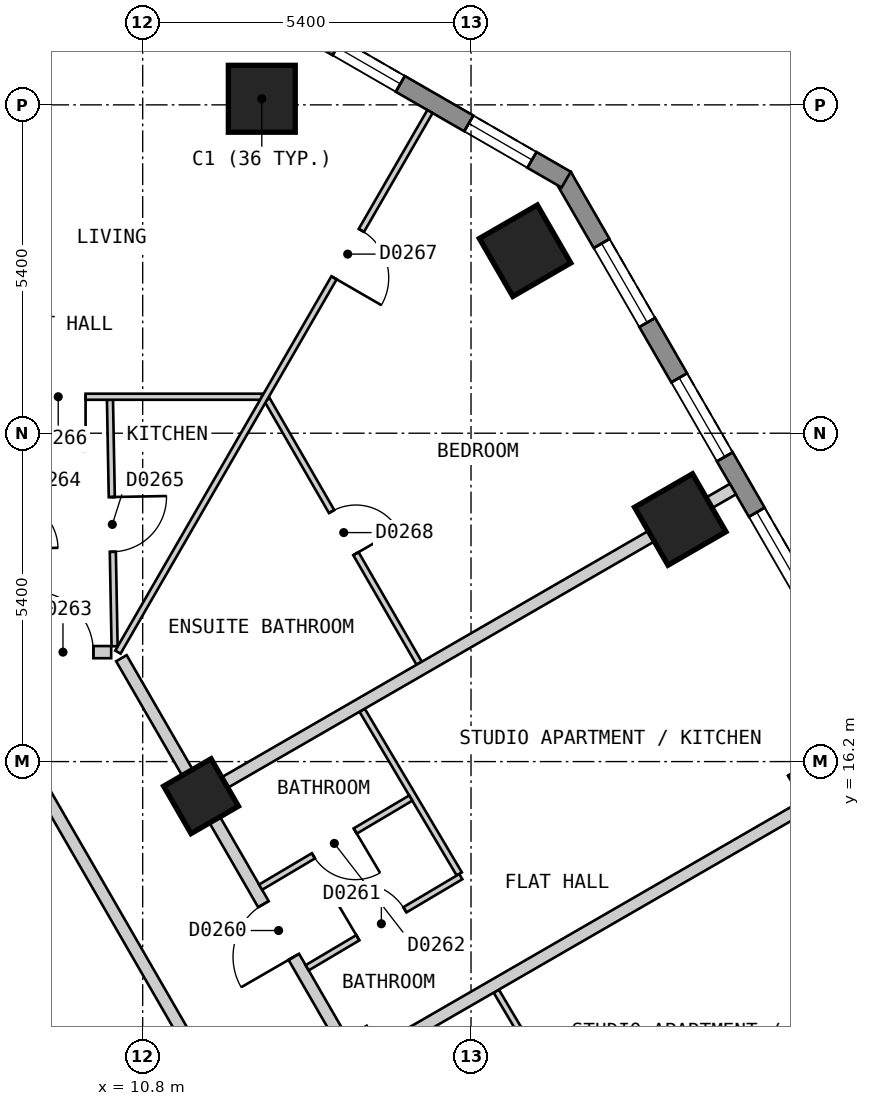
"""IFC4 building model, lengths in metres.
Left out: names, types, materials, properties, quantities, classifications, styles, units other than length and angle.
Written with IfcOpenShell. Run it as: python <this file> out.ifc"""

import sys

from ifc_helpers import new_model, si_unit, direction, frame, frame_2d, origin, origin_2d, place, context, subcontext, project, spatial, polyline, rectangle, outline, extrude, element, fill, save


model = new_model("IFC4")
c1 = context("Model", 3, precision=1e-05, world=origin(), true_north=direction((0.0, 1.0)))
c2 = subcontext(c1, "Body", "Model", "MODEL_VIEW")
j1 = project(units=[si_unit("LENGTHUNIT", "METRE"), si_unit("PLANEANGLEUNIT", "RADIAN")], contexts=[c1])
p1 = place(None, origin())
s1 = spatial("IfcSite", under=j1, at=p1, CompositionType="ELEMENT")
p2 = place(p1, origin())
s2 = spatial("IfcBuilding", under=s1, at=p2, CompositionType="ELEMENT")
p3 = place(p2, frame((0.0, 0.0, 41.4)))
s3 = spatial("IfcBuildingStorey", under=s2, at=p3, CompositionType="ELEMENT", Elevation=41.4)
for number, where, z_axis, x_axis in (
    (1, (12.759, 27.1, 0.0), (0.0, 0.0, 1.0), (-1.0, 0.0, 0.0)),
    (2, (22.193, 15.761, 0.0), (0.0, 0.0, 1.0), (-0.5, 0.866, 0.0)),
    (3, (19.641, 20.181, 0.0), (0.0, 0.0, 1.0), (-0.5, 0.866, 0.0)),
    (4, (17.089, 24.601, 0.0), (0.0, 0.0, 1.0), (-0.5, 0.866, 0.0)),
):
    element("IfcColumn", number, at=place(p3, frame(where, z_axis=z_axis, x_axis=x_axis)), inside=s3, PredefinedType="COLUMN", context=c2, shape_type="SweptSolid", body=[
        extrude(rectangle(XDim=1.1, YDim=1.1, at=origin_2d()), origin(), (0.0, 0.0, 1.0), 3.0),
    ])
p4 = place(p3, frame((11.76, 15.631, 0.0), z_axis=(0.0, 0.0, 1.0), x_axis=(-0.499984884929, 0.866034130299, 0.0)))
e5 = element("IfcColumn", 5, at=p4, inside=s3, PredefinedType="COLUMN", context=c2, shape_type="SweptSolid", body=[
    extrude(rectangle(XDim=0.9, YDim=0.9, at=origin_2d()), origin(), (0.0, 0.0, 1.0), 3.0),
])
p5 = place(p3, frame((31.22, 2.425, 0.0), z_axis=(0.0, 0.0, 1.0), x_axis=(-0.500001938803, 0.866024284413, 0.0)))
e6 = element("IfcWall", 6, at=p5, inside=s3, PredefinedType="SOLIDWALL", context=c2, shape_type="SweptSolid", body=[
    extrude(outline(polyline([(0.0, -0.15), (27.02, -0.15), (26.94, 0.15), (0.08, 0.15), (0.0, -0.15)])), origin(), (0.0, 0.0, 1.0), 2.7),
])
p6 = place(p5, frame((1.277, 0.0, 0.15)))
e7 = element("IfcOpeningElement", 7, at=p6, cuts=e6, PredefinedType="OPENING", context=c2, shape_type="SweptSolid", body=[
    extrude(rectangle(XDim=1.5, YDim=2.1, at=frame_2d((0.75, 1.05))), frame((0.0, 0.16, 0.0), z_axis=(0.0, -1.0, 0.0), x_axis=(1.0, 0.0, 0.0)), (0.0, 0.0, 1.0), 0.32),
])
p7 = place(p5, frame((3.829, 0.0, 0.15)))
e8 = element("IfcOpeningElement", 8, at=p7, cuts=e6, PredefinedType="OPENING", context=c2, shape_type="SweptSolid", body=[
    extrude(rectangle(XDim=1.5, YDim=2.1, at=frame_2d((0.75, 1.05))), frame((0.0, 0.16, 0.0), z_axis=(0.0, -1.0, 0.0), x_axis=(1.0, 0.0, 0.0)), (0.0, 0.0, 1.0), 0.32),
])
p8 = place(p5, frame((6.382, 0.0, 0.15)))
e9 = element("IfcOpeningElement", 9, at=p8, cuts=e6, PredefinedType="OPENING", context=c2, shape_type="SweptSolid", body=[
    extrude(rectangle(XDim=1.5, YDim=2.1, at=frame_2d((0.75, 1.05))), frame((0.0, 0.16, 0.0), z_axis=(0.0, -1.0, 0.0), x_axis=(1.0, 0.0, 0.0)), (0.0, 0.0, 1.0), 0.32),
])
p9 = place(p5, frame((8.933, 0.0, 0.15)))
e10 = element("IfcOpeningElement", 10, at=p9, cuts=e6, PredefinedType="OPENING", context=c2, shape_type="SweptSolid", body=[
    extrude(rectangle(XDim=1.5, YDim=2.1, at=frame_2d((0.75, 1.05))), frame((0.0, 0.16, 0.0), z_axis=(0.0, -1.0, 0.0), x_axis=(1.0, 0.0, 0.0)), (0.0, 0.0, 1.0), 0.32),
])
p10 = place(p5, frame((11.485, 0.0, 0.15)))
e11 = element("IfcOpeningElement", 11, at=p10, cuts=e6, PredefinedType="OPENING", context=c2, shape_type="SweptSolid", body=[
    extrude(rectangle(XDim=1.5, YDim=2.1, at=frame_2d((0.75, 1.05))), frame((0.0, 0.16, 0.0), z_axis=(0.0, -1.0, 0.0), x_axis=(1.0, 0.0, 0.0)), (0.0, 0.0, 1.0), 0.32),
])
p11 = place(p5, frame((14.037, 0.0, 0.15)))
e12 = element("IfcOpeningElement", 12, at=p11, cuts=e6, PredefinedType="OPENING", context=c2, shape_type="SweptSolid", body=[
    extrude(rectangle(XDim=1.5, YDim=2.1, at=frame_2d((0.75, 1.05))), frame((0.0, 0.16, 0.0), z_axis=(0.0, -1.0, 0.0), x_axis=(1.0, 0.0, 0.0)), (0.0, 0.0, 1.0), 0.32),
])
p12 = place(p5, frame((16.589, 0.0, 0.15)))
e13 = element("IfcOpeningElement", 13, at=p12, cuts=e6, PredefinedType="OPENING", context=c2, shape_type="SweptSolid", body=[
    extrude(rectangle(XDim=1.5, YDim=2.1, at=frame_2d((0.75, 1.05))), frame((0.0, 0.16, 0.0), z_axis=(0.0, -1.0, 0.0), x_axis=(1.0, 0.0, 0.0)), (0.0, 0.0, 1.0), 0.32),
])
p13 = place(p5, frame((19.141, 0.0, 0.15)))
e14 = element("IfcOpeningElement", 14, at=p13, cuts=e6, PredefinedType="OPENING", context=c2, shape_type="SweptSolid", body=[
    extrude(rectangle(XDim=1.5, YDim=2.1, at=frame_2d((0.75, 1.05))), frame((0.0, 0.16, 0.0), z_axis=(0.0, -1.0, 0.0), x_axis=(1.0, 0.0, 0.0)), (0.0, 0.0, 1.0), 0.32),
])
p14 = place(p5, frame((21.693, 0.0, 0.15)))
e15 = element("IfcOpeningElement", 15, at=p14, cuts=e6, PredefinedType="OPENING", context=c2, shape_type="SweptSolid", body=[
    extrude(rectangle(XDim=1.5, YDim=2.1, at=frame_2d((0.75, 1.05))), frame((0.0, 0.16, 0.0), z_axis=(0.0, -1.0, 0.0), x_axis=(1.0, 0.0, 0.0)), (0.0, 0.0, 1.0), 0.32),
])
p15 = place(p5, frame((24.244, 0.0, 0.15)))
e16 = element("IfcOpeningElement", 16, at=p15, cuts=e6, PredefinedType="OPENING", context=c2, shape_type="SweptSolid", body=[
    extrude(rectangle(XDim=1.5, YDim=2.1, at=frame_2d((0.75, 1.05))), frame((0.0, 0.16, 0.0), z_axis=(0.0, -1.0, 0.0), x_axis=(1.0, 0.0, 0.0)), (0.0, 0.0, 1.0), 0.32),
])
p16 = place(p3, frame((17.765, 25.77, 0.0), z_axis=(0.0, 0.0, 1.0), x_axis=(-0.866010750942, 0.50002537861, 0.0)))
e17 = element("IfcWall", 17, at=p16, inside=s3, PredefinedType="SOLIDWALL", context=c2, shape_type="SweptSolid", body=[
    extrude(outline(polyline([(0.0, -0.15), (5.0, -0.15), (4.919, 0.15), (0.08, 0.15), (0.0, -0.15)])), origin(), (0.0, 0.0, 1.0), 2.7),
])
p17 = place(p16, frame((0.65, 0.0, 0.15)))
e18 = element("IfcOpeningElement", 18, at=p17, cuts=e17, PredefinedType="OPENING", context=c2, shape_type="SweptSolid", body=[
    extrude(rectangle(XDim=1.2, YDim=2.1, at=frame_2d((0.6, 1.05))), frame((0.0, 0.16, 0.0), z_axis=(0.0, -1.0, 0.0), x_axis=(1.0, 0.0, 0.0)), (0.0, 0.0, 1.0), 0.32),
])
p18 = place(p16, frame((3.15, 0.0, 0.15)))
e19 = element("IfcOpeningElement", 19, at=p18, cuts=e17, PredefinedType="OPENING", context=c2, shape_type="SweptSolid", body=[
    extrude(rectangle(XDim=1.2, YDim=2.1, at=frame_2d((0.6, 1.05))), frame((0.0, 0.16, 0.0), z_axis=(0.0, -1.0, 0.0), x_axis=(1.0, 0.0, 0.0)), (0.0, 0.0, 1.0), 0.32),
])
p19 = place(p3, frame((6.409, 15.7, 0.0), z_axis=(0.0, 0.0, 1.0), x_axis=(0.499930377127, -0.866065596838, 0.0)))
e20 = element("IfcWall", 20, at=p19, inside=s3, PredefinedType="PARTITIONING", context=c2, shape_type="SweptSolid", body=[
    extrude(rectangle(XDim=8.775, YDim=0.2, at=frame_2d((4.388, 0.0))), origin(), (0.0, 0.0, 1.0), 2.7),
])
p20 = place(p3, frame((9.18, 15.7, 0.0), z_axis=(0.0, 0.0, 1.0), x_axis=(0.500003652032, -0.866023295272, 0.0)))
e21 = element("IfcWall", 21, at=p20, inside=s3, PredefinedType="PARTITIONING", context=c2, shape_type="SweptSolid", body=[
    extrude(rectangle(XDim=18.012, YDim=0.2, at=frame_2d((9.006, 0.0))), origin(), (0.0, 0.0, 1.0), 2.7),
])
p21 = place(p20, frame((8.556, 0.0, 0.0)))
e22 = element("IfcOpeningElement", 22, at=p21, cuts=e21, PredefinedType="OPENING", context=c2, shape_type="SweptSolid", body=[
    extrude(rectangle(XDim=0.9, YDim=2.1, at=frame_2d((0.45, 1.05))), frame((0.0, 0.11, 0.0), z_axis=(0.0, -1.0, 0.0), x_axis=(1.0, 0.0, 0.0)), (0.0, 0.0, 1.0), 0.22),
])
p22 = place(p3, frame((10.45, 17.9, 0.0), z_axis=(0.0, 0.0, 1.0), x_axis=(0.500034352617, -0.866005569383, 0.0)))
e23 = element("IfcWall", 23, at=p22, inside=s3, PredefinedType="PARTITIONING", context=c2, shape_type="SweptSolid", body=[
    extrude(rectangle(XDim=20.553, YDim=0.2, at=frame_2d((10.276, 0.0))), origin(), (0.0, 0.0, 1.0), 2.7),
])
p23 = place(p22, frame((14.879, 0.0, 0.0)))
e24 = element("IfcOpeningElement", 24, at=p23, cuts=e23, PredefinedType="OPENING", context=c2, shape_type="SweptSolid", body=[
    extrude(rectangle(XDim=1.0, YDim=2.1, at=frame_2d((0.5, 1.05))), frame((0.0, 0.11, 0.0), z_axis=(0.0, -1.0, 0.0), x_axis=(1.0, 0.0, 0.0)), (0.0, 0.0, 1.0), 0.22),
])
p24 = place(p22, frame((9.775, 0.0, 0.0)))
e25 = element("IfcOpeningElement", 25, at=p24, cuts=e23, PredefinedType="OPENING", context=c2, shape_type="SweptSolid", body=[
    extrude(rectangle(XDim=1.0, YDim=2.1, at=frame_2d((0.5, 1.05))), frame((0.0, 0.11, 0.0), z_axis=(0.0, -1.0, 0.0), x_axis=(1.0, 0.0, 0.0)), (0.0, 0.0, 1.0), 0.22),
])
p25 = place(p22, frame((4.671, 0.0, 0.0)))
e26 = element("IfcOpeningElement", 26, at=p25, cuts=e23, PredefinedType="OPENING", context=c2, shape_type="SweptSolid", body=[
    extrude(rectangle(XDim=1.0, YDim=2.1, at=frame_2d((0.5, 1.05))), frame((0.0, 0.11, 0.0), z_axis=(0.0, -1.0, 0.0), x_axis=(1.0, 0.0, 0.0)), (0.0, 0.0, 1.0), 0.22),
])
p26 = place(p3, frame((-10.276, 18.0, 0.0), z_axis=(0.0, 0.0, 1.0), x_axis=(1.0, 0.0, 0.0)))
e27 = element("IfcWall", 27, at=p26, inside=s3, PredefinedType="PARTITIONING", context=c2, shape_type="SweptSolid", body=[
    extrude(rectangle(XDim=20.558, YDim=0.2, at=frame_2d((10.279, 0.0))), origin(), (0.0, 0.0, 1.0), 2.7),
])
p27 = place(p26, frame((19.265, 0.0, 0.0)))
e28 = element("IfcOpeningElement", 28, at=p27, cuts=e27, PredefinedType="OPENING", context=c2, shape_type="SweptSolid", body=[
    extrude(rectangle(XDim=1.0, YDim=2.1, at=frame_2d((0.5, 1.05))), frame((0.0, 0.11, 0.0), z_axis=(0.0, -1.0, 0.0), x_axis=(1.0, 0.0, 0.0)), (0.0, 0.0, 1.0), 0.22),
])
p28 = place(p26, frame((14.879, 0.0, 0.0)))
e29 = element("IfcOpeningElement", 29, at=p28, cuts=e27, PredefinedType="OPENING", context=c2, shape_type="SweptSolid", body=[
    extrude(rectangle(XDim=1.0, YDim=2.1, at=frame_2d((0.5, 1.05))), frame((0.0, 0.11, 0.0), z_axis=(0.0, -1.0, 0.0), x_axis=(1.0, 0.0, 0.0)), (0.0, 0.0, 1.0), 0.22),
])
p29 = place(p26, frame((4.671, 0.0, 0.0)))
e30 = element("IfcOpeningElement", 30, at=p29, cuts=e27, PredefinedType="OPENING", context=c2, shape_type="SweptSolid", body=[
    extrude(rectangle(XDim=1.0, YDim=2.1, at=frame_2d((0.5, 1.05))), frame((0.0, 0.11, 0.0), z_axis=(0.0, -1.0, 0.0), x_axis=(1.0, 0.0, 0.0)), (0.0, 0.0, 1.0), 0.22),
])
p30 = place(p3, frame((16.615, 12.425, 0.0), z_axis=(0.0, 0.0, 1.0), x_axis=(0.510241930604, -0.860030913546, 0.0)))
e31 = element("IfcWall", 31, at=p30, inside=s3, PredefinedType="PARTITIONING", context=c2, shape_type="SweptSolid", body=[
    extrude(rectangle(XDim=3.136, YDim=0.1, at=frame_2d((1.568, 0.0))), origin(), (0.0, 0.0, 1.0), 2.7),
])
p31 = place(p3, frame((14.409, 17.045, 0.0), z_axis=(0.0, 0.0, 1.0), x_axis=(0.510362209222, -0.859959542884, 0.0)))
e32 = element("IfcWall", 32, at=p31, inside=s3, PredefinedType="PARTITIONING", context=c2, shape_type="SweptSolid", body=[
    extrude(rectangle(XDim=3.131, YDim=0.1, at=frame_2d((1.566, 0.0))), origin(), (0.0, 0.0, 1.0), 2.7),
])
p32 = place(p3, frame((12.846, 22.15, 0.0), z_axis=(0.0, 0.0, 1.0), x_axis=(0.500002715276, -0.866023836113, 0.0)))
e33 = element("IfcWall", 33, at=p32, inside=s3, PredefinedType="PARTITIONING", context=c2, shape_type="SweptSolid", body=[
    extrude(rectangle(XDim=5.002, YDim=0.1, at=frame_2d((2.501, 0.0))), origin(), (0.0, 0.0, 1.0), 2.7),
])
p33 = place(p32, frame((2.122, 0.0, 0.0)))
e34 = element("IfcOpeningElement", 34, at=p33, cuts=e33, PredefinedType="OPENING", context=c2, shape_type="SweptSolid", body=[
    extrude(rectangle(XDim=0.8, YDim=2.1, at=frame_2d((0.4, 1.05))), frame((0.0, 0.06, 0.0), z_axis=(0.0, -1.0, 0.0), x_axis=(1.0, 0.0, 0.0)), (0.0, 0.0, 1.0), 0.12),
])
p34 = place(p3, frame((10.262, 22.15, 0.0), z_axis=(0.0, 0.0, 1.0), x_axis=(0.018730524712, -0.999824568334, 0.0)))
e35 = element("IfcWall", 35, at=p34, inside=s3, PredefinedType="PARTITIONING", context=c2, shape_type="SweptSolid", body=[
    extrude(rectangle(XDim=4.054, YDim=0.1, at=frame_2d((2.027, 0.0))), origin(), (0.0, 0.0, 1.0), 2.7),
])
p35 = place(p34, frame((1.6, 0.0, 0.0)))
e36 = element("IfcOpeningElement", 36, at=p35, cuts=e35, PredefinedType="OPENING", context=c2, shape_type="SweptSolid", body=[
    extrude(rectangle(XDim=0.9, YDim=2.1, at=frame_2d((0.45, 1.05))), frame((0.0, 0.06, 0.0), z_axis=(0.0, -1.0, 0.0), x_axis=(1.0, 0.0, 0.0)), (0.0, 0.0, 1.0), 0.12),
])
p36 = place(p3, frame((7.755, 22.2, 0.0), z_axis=(0.0, 0.0, 1.0), x_axis=(1.0, 0.0, 0.0)))
e37 = element("IfcWall", 37, at=p36, inside=s3, PredefinedType="PARTITIONING", context=c2, shape_type="SweptSolid", body=[
    extrude(rectangle(XDim=5.005, YDim=0.1, at=frame_2d((2.502, 0.0))), origin(), (0.0, 0.0, 1.0), 2.7),
])
p37 = place(p36, frame((1.206, 0.0, 0.0)))
e38 = element("IfcOpeningElement", 38, at=p37, cuts=e37, PredefinedType="OPENING", context=c2, shape_type="SweptSolid", body=[
    extrude(rectangle(XDim=0.9, YDim=2.1, at=frame_2d((0.45, 1.05))), frame((0.0, 0.06, 0.0), z_axis=(0.0, -1.0, 0.0), x_axis=(1.0, 0.0, 0.0)), (0.0, 0.0, 1.0), 0.12),
])
p38 = place(p3, frame((10.393, 18.0, 0.0), z_axis=(0.0, 0.0, 1.0), x_axis=(0.499945497007, 0.866056868816, 0.0)))
e39 = element("IfcWall", 39, at=p38, inside=s3, PredefinedType="PARTITIONING", context=c2, shape_type="SweptSolid", body=[
    extrude(rectangle(XDim=10.265, YDim=0.1, at=frame_2d((5.132, 0.0))), origin(), (0.0, 0.0, 1.0), 2.7),
])
p39 = place(p38, frame((7.108, 0.0, 0.0)))
e40 = element("IfcOpeningElement", 40, at=p39, cuts=e39, PredefinedType="OPENING", context=c2, shape_type="SweptSolid", body=[
    extrude(rectangle(XDim=0.9, YDim=2.1, at=frame_2d((0.45, 1.05))), frame((0.0, 0.06, 0.0), z_axis=(0.0, -1.0, 0.0), x_axis=(1.0, 0.0, 0.0)), (0.0, 0.0, 1.0), 0.12),
])
p40 = place(p3, frame((13.505, 12.809, 0.0), z_axis=(0.0, 0.0, 1.0), x_axis=(0.860070102739, 0.510175870043, 0.0)))
e41 = element("IfcWall", 41, at=p40, inside=s3, PredefinedType="PARTITIONING", context=c2, shape_type="SweptSolid", body=[
    extrude(rectangle(XDim=2.938, YDim=0.1, at=frame_2d((1.469, 0.0))), origin(), (0.0, 0.0, 1.0), 2.7),
])
p41 = place(p40, frame((0.969, 0.0, 0.0)))
e42 = element("IfcOpeningElement", 42, at=p41, cuts=e41, PredefinedType="OPENING", context=c2, shape_type="SweptSolid", body=[
    extrude(rectangle(XDim=0.9, YDim=2.1, at=frame_2d((0.45, 1.05))), frame((0.0, 0.06, 0.0), z_axis=(0.0, -1.0, 0.0), x_axis=(1.0, 0.0, 0.0)), (0.0, 0.0, 1.0), 0.12),
])
p42 = place(p3, frame((12.739, 14.135, 0.0), z_axis=(0.0, 0.0, 1.0), x_axis=(0.860077414703, 0.510163543109, 0.0)))
e43 = element("IfcWall", 43, at=p42, inside=s3, PredefinedType="PARTITIONING", context=c2, shape_type="SweptSolid", body=[
    extrude(rectangle(XDim=2.872, YDim=0.1, at=frame_2d((1.436, 0.0))), origin(), (0.0, 0.0, 1.0), 2.7),
])
p43 = place(p42, frame((1.01, 0.0, 0.0)))
e44 = element("IfcOpeningElement", 44, at=p43, cuts=e43, PredefinedType="OPENING", context=c2, shape_type="SweptSolid", body=[
    extrude(rectangle(XDim=0.8, YDim=2.1, at=frame_2d((0.4, 1.05))), frame((0.0, 0.06, 0.0), z_axis=(0.0, -1.0, 0.0), x_axis=(1.0, 0.0, 0.0)), (0.0, 0.0, 1.0), 0.12),
])
for number, where, z_axis, x_axis in (
    (45, (16.95, 6.841, 0.0), (0.0, 0.0, 1.0), (0.866, 0.5, 0.0)),
    (46, (11.847, 15.681, 0.0), (0.0, 0.0, 1.0), (0.866, 0.5, 0.0)),
    (47, (14.399, 11.261, 0.0), (0.0, 0.0, 1.0), (0.866, 0.5, 0.0)),
):
    element("IfcWall", number, at=place(p3, frame(where, z_axis=z_axis, x_axis=x_axis)), inside=s3, PredefinedType="PARTITIONING", context=c2, shape_type="SweptSolid", body=[
        extrude(rectangle(XDim=10.0, YDim=0.2, at=frame_2d((5.0, 0.0))), origin(), (0.0, 0.0, 1.0), 2.7),
    ])
p44 = place(p13, origin())
e48 = element("IfcWindow", 48, at=p44, inside=s3, PartitioningType="SINGLE_PANEL", PredefinedType="WINDOW", context=c2, shape_type="SweptSolid", body=[
    extrude(rectangle(XDim=1.5, YDim=2.1, at=frame_2d((0.75, 1.05))), frame((0.0, 0.03, 0.0), z_axis=(0.0, -1.0, 0.0), x_axis=(1.0, 0.0, 0.0)), (0.0, 0.0, 1.0), 0.06),
])
fill(e14, e48)
p45 = place(p14, origin())
e49 = element("IfcWindow", 49, at=p45, inside=s3, PartitioningType="SINGLE_PANEL", PredefinedType="WINDOW", context=c2, shape_type="SweptSolid", body=[
    extrude(rectangle(XDim=1.5, YDim=2.1, at=frame_2d((0.75, 1.05))), frame((0.0, 0.03, 0.0), z_axis=(0.0, -1.0, 0.0), x_axis=(1.0, 0.0, 0.0)), (0.0, 0.0, 1.0), 0.06),
])
fill(e15, e49)
p46 = place(p15, origin())
e50 = element("IfcWindow", 50, at=p46, inside=s3, PartitioningType="SINGLE_PANEL", PredefinedType="WINDOW", context=c2, shape_type="SweptSolid", body=[
    extrude(rectangle(XDim=1.5, YDim=2.1, at=frame_2d((0.75, 1.05))), frame((0.0, 0.03, 0.0), z_axis=(0.0, -1.0, 0.0), x_axis=(1.0, 0.0, 0.0)), (0.0, 0.0, 1.0), 0.06),
])
fill(e16, e50)
p47 = place(p17, origin())
e51 = element("IfcWindow", 51, at=p47, inside=s3, PartitioningType="SINGLE_PANEL", PredefinedType="WINDOW", context=c2, shape_type="SweptSolid", body=[
    extrude(rectangle(XDim=1.2, YDim=2.1, at=frame_2d((0.6, 1.05))), frame((0.0, 0.03, 0.0), z_axis=(0.0, -1.0, 0.0), x_axis=(1.0, 0.0, 0.0)), (0.0, 0.0, 1.0), 0.06),
])
fill(e18, e51)
p48 = place(p18, origin())
e52 = element("IfcWindow", 52, at=p48, inside=s3, PartitioningType="SINGLE_PANEL", PredefinedType="WINDOW", context=c2, shape_type="SweptSolid", body=[
    extrude(rectangle(XDim=1.2, YDim=2.1, at=frame_2d((0.6, 1.05))), frame((0.0, 0.03, 0.0), z_axis=(0.0, -1.0, 0.0), x_axis=(1.0, 0.0, 0.0)), (0.0, 0.0, 1.0), 0.06),
])
fill(e19, e52)
p49 = place(p25, origin())
e53 = element("IfcDoor", 53, at=p49, inside=s3, OperationType="SINGLE_SWING_RIGHT", PredefinedType="DOOR", context=c2, shape_type="SweptSolid", body=[
    extrude(rectangle(XDim=1.0, YDim=2.1, at=frame_2d((0.5, 1.05))), frame((0.0, 0.025, 0.0), z_axis=(0.0, -1.0, 0.0), x_axis=(1.0, 0.0, 0.0)), (0.0, 0.0, 1.0), 0.05),
])
fill(e26, e53)
p50 = place(p41, origin())
e54 = element("IfcDoor", 54, at=p50, inside=s3, OperationType="SINGLE_SWING_LEFT", PredefinedType="DOOR", context=c2, shape_type="SweptSolid", body=[
    extrude(rectangle(XDim=0.9, YDim=2.1, at=frame_2d((0.45, 1.05))), frame((0.0, 0.025, 0.0), z_axis=(0.0, -1.0, 0.0), x_axis=(1.0, 0.0, 0.0)), (0.0, 0.0, 1.0), 0.05),
])
fill(e42, e54)
p51 = place(p43, origin())
e55 = element("IfcDoor", 55, at=p51, inside=s3, OperationType="SINGLE_SWING_RIGHT", PredefinedType="DOOR", context=c2, shape_type="SweptSolid", body=[
    extrude(rectangle(XDim=0.8, YDim=2.1, at=frame_2d((0.4, 1.05))), frame((0.0, 0.025, 0.0), z_axis=(0.0, -1.0, 0.0), x_axis=(1.0, 0.0, 0.0)), (0.0, 0.0, 1.0), 0.05),
])
fill(e44, e55)
p52 = place(p27, origin())
e56 = element("IfcDoor", 56, at=p52, inside=s3, OperationType="SINGLE_SWING_LEFT", PredefinedType="DOOR", context=c2, shape_type="SweptSolid", body=[
    extrude(rectangle(XDim=1.0, YDim=2.1, at=frame_2d((0.5, 1.05))), frame((0.0, 0.025, 0.0), z_axis=(0.0, -1.0, 0.0), x_axis=(1.0, 0.0, 0.0)), (0.0, 0.0, 1.0), 0.05),
])
fill(e28, e56)
p53 = place(p35, origin())
e57 = element("IfcDoor", 57, at=p53, inside=s3, OperationType="SINGLE_SWING_LEFT", PredefinedType="DOOR", context=c2, shape_type="SweptSolid", body=[
    extrude(rectangle(XDim=0.9, YDim=2.1, at=frame_2d((0.45, 1.05))), frame((0.0, 0.025, 0.0), z_axis=(0.0, -1.0, 0.0), x_axis=(1.0, 0.0, 0.0)), (0.0, 0.0, 1.0), 0.05),
])
fill(e36, e57)
p54 = place(p37, origin())
e58 = element("IfcDoor", 58, at=p54, inside=s3, OperationType="SINGLE_SWING_RIGHT", PredefinedType="DOOR", context=c2, shape_type="SweptSolid", body=[
    extrude(rectangle(XDim=0.9, YDim=2.1, at=frame_2d((0.45, 1.05))), frame((0.0, 0.025, 0.0), z_axis=(0.0, -1.0, 0.0), x_axis=(1.0, 0.0, 0.0)), (0.0, 0.0, 1.0), 0.05),
])
fill(e38, e58)
p55 = place(p39, origin())
e59 = element("IfcDoor", 59, at=p55, inside=s3, OperationType="SINGLE_SWING_LEFT", PredefinedType="DOOR", context=c2, shape_type="SweptSolid", body=[
    extrude(rectangle(XDim=0.9, YDim=2.1, at=frame_2d((0.45, 1.05))), frame((0.0, 0.025, 0.0), z_axis=(0.0, -1.0, 0.0), x_axis=(1.0, 0.0, 0.0)), (0.0, 0.0, 1.0), 0.05),
])
fill(e40, e59)
p56 = place(p33, origin())
e60 = element("IfcDoor", 60, at=p56, inside=s3, OperationType="SINGLE_SWING_RIGHT", PredefinedType="DOOR", context=c2, shape_type="SweptSolid", body=[
    extrude(rectangle(XDim=0.8, YDim=2.1, at=frame_2d((0.4, 1.05))), frame((0.0, 0.025, 0.0), z_axis=(0.0, -1.0, 0.0), x_axis=(1.0, 0.0, 0.0)), (0.0, 0.0, 1.0), 0.05),
])
fill(e34, e60)
save(model, sys.argv[1])
